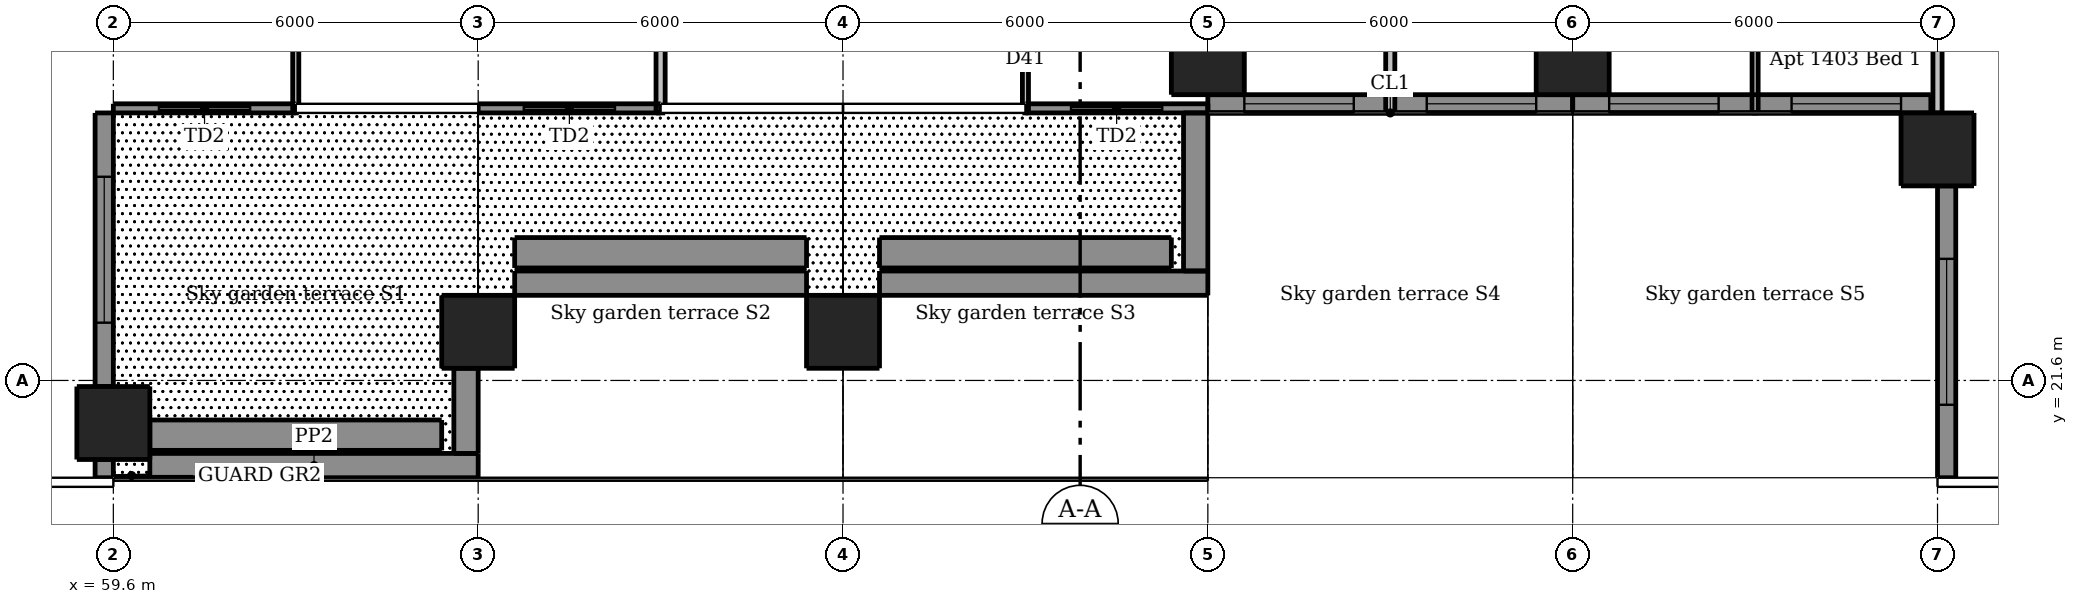
"""IFC4 building model, lengths in metres.
Left out: names, types, materials, properties, quantities, classifications, styles, units other than length and angle.
Written with IfcOpenShell. Run it as: python <this file> out.ifc"""

import sys

from ifc_helpers import new_model, si_unit, direction, frame, frame_2d, origin, origin_2d, place, context, subcontext, project, spatial, rectangle, extrude, element, fill, save


model = new_model("IFC4")
c1 = context("Model", 3, precision=1e-05, world=origin(), true_north=direction((0.0, 1.0)))
c2 = subcontext(c1, "Body", "Model", "MODEL_VIEW")
j1 = project(units=[si_unit("LENGTHUNIT", "METRE"), si_unit("PLANEANGLEUNIT", "RADIAN")], contexts=[c1])
p1 = place(None, origin())
s1 = spatial("IfcSite", under=j1, at=p1, CompositionType="ELEMENT")
p2 = place(p1, origin())
s2 = spatial("IfcBuilding", under=s1, at=p2, CompositionType="ELEMENT")
p3 = place(p2, frame((0.0, 0.0, 53.2)))
s3 = spatial("IfcBuildingStorey", under=s2, at=p3, CompositionType="ELEMENT", Elevation=53.2)
p4 = place(p3, frame((59.6, 20.9, 0.0), z_axis=(0.0, 0.0, 1.0), x_axis=(1.0, 0.0, 0.0)))
e1 = element("IfcColumn", 1, at=p4, inside=s3, PredefinedType="COLUMN", context=c2, shape_type="SweptSolid", body=[
    extrude(rectangle(XDim=1.2, YDim=1.2, at=origin_2d()), origin(), (0.0, 0.0, 1.0), 3.05),
])
for number, where, z_axis, x_axis in (
    (2, (65.6, 22.4, 0.0), (0.0, 0.0, 1.0), (1.0, 0.0, 0.0)),
    (3, (71.6, 22.4, 0.0), (0.0, 0.0, 1.0), (1.0, 0.0, 0.0)),
):
    element("IfcColumn", number, at=place(p3, frame(where, z_axis=z_axis, x_axis=x_axis)), inside=s3, PredefinedType="COLUMN", context=c2, shape_type="SweptSolid", body=[
        extrude(rectangle(XDim=1.2, YDim=1.2, at=origin_2d()), origin(), (0.0, 0.0, 1.0), 3.3),
    ])
for number, where, z_axis, x_axis in (
    (4, (77.6, 26.9, 0.0), (0.0, 0.0, 1.0), (1.0, 0.0, 0.0)),
    (5, (83.6, 26.9, 0.0), (0.0, 0.0, 1.0), (1.0, 0.0, 0.0)),
    (6, (89.6, 25.4, 0.0), (0.0, 0.0, 1.0), (1.0, 0.0, 0.0)),
):
    element("IfcColumn", number, at=place(p3, frame(where, z_axis=z_axis, x_axis=x_axis)), inside=s3, PredefinedType="COLUMN", context=c2, shape_type="SweptSolid", body=[
        extrude(rectangle(XDim=1.2, YDim=1.2, at=origin_2d()), origin(), (0.0, 0.0, 1.0), 3.05),
    ])
p5 = place(p3, frame((59.45, 20.0, 0.0), z_axis=(0.0, 0.0, 1.0), x_axis=(0.0, 1.0, 0.0)))
e7 = element("IfcWall", 7, at=p5, inside=s3, PredefinedType="SOLIDWALL", context=c2, shape_type="SweptSolid", body=[
    extrude(rectangle(XDim=0.3, YDim=0.3, at=frame_2d((0.15, 0.0))), origin(), (0.0, 0.0, 1.0), 3.05),
])
p6 = place(p3, frame((59.45, 21.5, 0.0), z_axis=(0.0, 0.0, 1.0), x_axis=(0.0, 1.0, 0.0)))
e8 = element("IfcWall", 8, at=p6, inside=s3, PredefinedType="SOLIDWALL", context=c2, shape_type="SweptSolid", body=[
    extrude(rectangle(XDim=4.5, YDim=0.3, at=frame_2d((2.25, 0.0))), origin(), (0.0, 0.0, 1.0), 3.05),
])
p7 = place(p6, frame((1.05, 0.0, 0.15)))
e9 = element("IfcOpeningElement", 9, at=p7, cuts=e8, PredefinedType="OPENING", context=c2, shape_type="SweptSolid", body=[
    extrude(rectangle(XDim=2.4, YDim=2.1, at=frame_2d((1.2, 1.05))), frame((0.0, 0.16, 0.0), z_axis=(0.0, -1.0, 0.0), x_axis=(1.0, 0.0, 0.0)), (0.0, 0.0, 1.0), 0.32),
])
p8 = place(p3, frame((89.75, 24.8, 0.0), z_axis=(0.0, 0.0, 1.0), x_axis=(0.0, -1.0, 0.0)))
e10 = element("IfcWall", 10, at=p8, inside=s3, PredefinedType="SOLIDWALL", context=c2, shape_type="SweptSolid", body=[
    extrude(rectangle(XDim=4.8, YDim=0.3, at=frame_2d((2.4, 0.0))), origin(), (0.0, 0.0, 1.0), 3.05),
])
p9 = place(p8, frame((1.2, 0.0, 0.15)))
e11 = element("IfcOpeningElement", 11, at=p9, cuts=e10, PredefinedType="OPENING", context=c2, shape_type="SweptSolid", body=[
    extrude(rectangle(XDim=2.4, YDim=2.1, at=frame_2d((1.2, 1.05))), frame((0.0, 0.16, 0.0), z_axis=(0.0, -1.0, 0.0), x_axis=(1.0, 0.0, 0.0)), (0.0, 0.0, 1.0), 0.32),
])
p10 = place(p3, frame((59.6, 26.075, 0.0), z_axis=(0.0, 0.0, 1.0), x_axis=(1.0, 0.0, 0.0)))
e12 = element("IfcWall", 12, at=p10, inside=s3, PredefinedType="SOLIDWALL", context=c2, shape_type="SweptSolid", body=[
    extrude(rectangle(XDim=3.0, YDim=0.15, at=frame_2d((1.5, 0.0))), origin(), (0.0, 0.0, 1.0), 3.05),
])
p11 = place(p10, frame((0.75, 0.0, 0.0)))
e13 = element("IfcOpeningElement", 13, at=p11, cuts=e12, PredefinedType="OPENING", context=c2, shape_type="SweptSolid", body=[
    extrude(rectangle(XDim=1.5, YDim=2.4, at=frame_2d((0.75, 1.2))), frame((0.0, 0.085, 0.0), z_axis=(0.0, -1.0, 0.0), x_axis=(1.0, 0.0, 0.0)), (0.0, 0.0, 1.0), 0.17),
])
p12 = place(p3, frame((65.6, 26.075, 0.0), z_axis=(0.0, 0.0, 1.0), x_axis=(1.0, 0.0, 0.0)))
e14 = element("IfcWall", 14, at=p12, inside=s3, PredefinedType="SOLIDWALL", context=c2, shape_type="SweptSolid", body=[
    extrude(rectangle(XDim=3.0, YDim=0.15, at=frame_2d((1.5, 0.0))), origin(), (0.0, 0.0, 1.0), 3.05),
])
p13 = place(p12, frame((0.75, 0.0, 0.0)))
e15 = element("IfcOpeningElement", 15, at=p13, cuts=e14, PredefinedType="OPENING", context=c2, shape_type="SweptSolid", body=[
    extrude(rectangle(XDim=1.5, YDim=2.4, at=frame_2d((0.75, 1.2))), frame((0.0, 0.085, 0.0), z_axis=(0.0, -1.0, 0.0), x_axis=(1.0, 0.0, 0.0)), (0.0, 0.0, 1.0), 0.17),
])
p14 = place(p3, frame((74.6, 26.075, 0.0), z_axis=(0.0, 0.0, 1.0), x_axis=(1.0, 0.0, 0.0)))
e16 = element("IfcWall", 16, at=p14, inside=s3, PredefinedType="SOLIDWALL", context=c2, shape_type="SweptSolid", body=[
    extrude(rectangle(XDim=3.0, YDim=0.15, at=frame_2d((1.5, 0.0))), origin(), (0.0, 0.0, 1.0), 3.05),
])
p15 = place(p14, frame((0.75, 0.0, 0.0)))
e17 = element("IfcOpeningElement", 17, at=p15, cuts=e16, PredefinedType="OPENING", context=c2, shape_type="SweptSolid", body=[
    extrude(rectangle(XDim=1.5, YDim=2.4, at=frame_2d((0.75, 1.2))), frame((0.0, 0.085, 0.0), z_axis=(0.0, -1.0, 0.0), x_axis=(1.0, 0.0, 0.0)), (0.0, 0.0, 1.0), 0.17),
])
p16 = place(p3, frame((77.6, 26.15, 0.0), z_axis=(0.0, 0.0, 1.0), x_axis=(1.0, 0.0, 0.0)))
e18 = element("IfcWall", 18, at=p16, inside=s3, PredefinedType="SOLIDWALL", context=c2, shape_type="SweptSolid", body=[
    extrude(rectangle(XDim=6.0, YDim=0.3, at=frame_2d((3.0, 0.0))), origin(), (0.0, 0.0, 1.0), 3.05),
])
p17 = place(p16, frame((0.6, 0.0, 0.15)))
e19 = element("IfcOpeningElement", 19, at=p17, cuts=e18, PredefinedType="OPENING", context=c2, shape_type="SweptSolid", body=[
    extrude(rectangle(XDim=1.8, YDim=2.1, at=frame_2d((0.9, 1.05))), frame((0.0, 0.16, 0.0), z_axis=(0.0, -1.0, 0.0), x_axis=(1.0, 0.0, 0.0)), (0.0, 0.0, 1.0), 0.32),
])
p18 = place(p16, frame((3.6, 0.0, 0.15)))
e20 = element("IfcOpeningElement", 20, at=p18, cuts=e18, PredefinedType="OPENING", context=c2, shape_type="SweptSolid", body=[
    extrude(rectangle(XDim=1.8, YDim=2.1, at=frame_2d((0.9, 1.05))), frame((0.0, 0.16, 0.0), z_axis=(0.0, -1.0, 0.0), x_axis=(1.0, 0.0, 0.0)), (0.0, 0.0, 1.0), 0.32),
])
p19 = place(p3, frame((83.6, 26.15, 0.0), z_axis=(0.0, 0.0, 1.0), x_axis=(1.0, 0.0, 0.0)))
e21 = element("IfcWall", 21, at=p19, inside=s3, PredefinedType="SOLIDWALL", context=c2, shape_type="SweptSolid", body=[
    extrude(rectangle(XDim=5.89, YDim=0.3, at=frame_2d((2.945, 0.0))), origin(), (0.0, 0.0, 1.0), 3.05),
])
p20 = place(p19, frame((0.6, 0.0, 0.15)))
e22 = element("IfcOpeningElement", 22, at=p20, cuts=e21, PredefinedType="OPENING", context=c2, shape_type="SweptSolid", body=[
    extrude(rectangle(XDim=1.8, YDim=2.1, at=frame_2d((0.9, 1.05))), frame((0.0, 0.16, 0.0), z_axis=(0.0, -1.0, 0.0), x_axis=(1.0, 0.0, 0.0)), (0.0, 0.0, 1.0), 0.32),
])
p21 = place(p19, frame((3.6, 0.0, 0.15)))
e23 = element("IfcOpeningElement", 23, at=p21, cuts=e21, PredefinedType="OPENING", context=c2, shape_type="SweptSolid", body=[
    extrude(rectangle(XDim=1.8, YDim=2.1, at=frame_2d((0.9, 1.05))), frame((0.0, 0.16, 0.0), z_axis=(0.0, -1.0, 0.0), x_axis=(1.0, 0.0, 0.0)), (0.0, 0.0, 1.0), 0.32),
])
p22 = place(p3, frame((60.2, 20.2, 0.03), z_axis=(0.0, 0.0, 1.0), x_axis=(1.0, 0.0, 0.0)))
e24 = element("IfcWall", 24, at=p22, inside=s3, PredefinedType="PARAPET", context=c2, shape_type="SweptSolid", body=[
    extrude(rectangle(XDim=5.4, YDim=0.4, at=frame_2d((2.7, 0.0))), origin(), (0.0, 0.0, 1.0), 1.1),
])
p23 = place(p3, frame((65.4, 20.4, 0.03), z_axis=(0.0, 0.0, 1.0), x_axis=(0.0, 1.0, 0.0)))
e25 = element("IfcWall", 25, at=p23, inside=s3, PredefinedType="PARAPET", context=c2, shape_type="SweptSolid", body=[
    extrude(rectangle(XDim=1.4, YDim=0.4, at=frame_2d((0.7, 0.0))), origin(), (0.0, 0.0, 1.0), 1.1),
])
p24 = place(p3, frame((60.2, 20.7, 0.03), z_axis=(0.0, 0.0, 1.0), x_axis=(1.0, 0.0, 0.0)))
e26 = element("IfcWall", 26, at=p24, inside=s3, PredefinedType="SOLIDWALL", context=c2, shape_type="SweptSolid", body=[
    extrude(rectangle(XDim=4.8, YDim=0.5, at=frame_2d((2.4, 0.0))), origin(), (0.0, 0.0, 1.0), 0.6),
])
p25 = place(p3, frame((66.2, 23.2, 0.03), z_axis=(0.0, 0.0, 1.0), x_axis=(1.0, 0.0, 0.0)))
e27 = element("IfcWall", 27, at=p25, inside=s3, PredefinedType="PARAPET", context=c2, shape_type="SweptSolid", body=[
    extrude(rectangle(XDim=4.8, YDim=0.4, at=frame_2d((2.4, 0.0))), origin(), (0.0, 0.0, 1.0), 1.1),
])
p26 = place(p3, frame((66.2, 23.7, 0.03), z_axis=(0.0, 0.0, 1.0), x_axis=(1.0, 0.0, 0.0)))
e28 = element("IfcWall", 28, at=p26, inside=s3, PredefinedType="SOLIDWALL", context=c2, shape_type="SweptSolid", body=[
    extrude(rectangle(XDim=4.8, YDim=0.5, at=frame_2d((2.4, 0.0))), origin(), (0.0, 0.0, 1.0), 0.6),
])
p27 = place(p3, frame((72.2, 23.2, 0.03), z_axis=(0.0, 0.0, 1.0), x_axis=(1.0, 0.0, 0.0)))
e29 = element("IfcWall", 29, at=p27, inside=s3, PredefinedType="PARAPET", context=c2, shape_type="SweptSolid", body=[
    extrude(rectangle(XDim=5.4, YDim=0.4, at=frame_2d((2.7, 0.0))), origin(), (0.0, 0.0, 1.0), 1.1),
])
p28 = place(p3, frame((77.4, 23.4, 0.03), z_axis=(0.0, 0.0, 1.0), x_axis=(0.0, 1.0, 0.0)))
e30 = element("IfcWall", 30, at=p28, inside=s3, PredefinedType="PARAPET", context=c2, shape_type="SweptSolid", body=[
    extrude(rectangle(XDim=2.6, YDim=0.4, at=frame_2d((1.3, 0.0))), origin(), (0.0, 0.0, 1.0), 1.1),
])
p29 = place(p3, frame((72.2, 23.7, 0.03), z_axis=(0.0, 0.0, 1.0), x_axis=(1.0, 0.0, 0.0)))
e31 = element("IfcWall", 31, at=p29, inside=s3, PredefinedType="SOLIDWALL", context=c2, shape_type="SweptSolid", body=[
    extrude(rectangle(XDim=4.8, YDim=0.5, at=frame_2d((2.4, 0.0))), origin(), (0.0, 0.0, 1.0), 0.6),
])
p30 = place(p3, frame((62.6, 31.625, 0.0), z_axis=(0.0, 0.0, 1.0), x_axis=(0.0, -1.0, 0.0)))
e32 = element("IfcWall", 32, at=p30, inside=s3, PredefinedType="PARTITIONING", context=c2, shape_type="SweptSolid", body=[
    extrude(rectangle(XDim=5.625, YDim=0.1, at=frame_2d((2.812, 0.0))), origin(), (0.0, 0.0, 1.0), 3.05),
])
p31 = place(p30, frame((0.525, 0.0, 0.0)))
e33 = element("IfcOpeningElement", 33, at=p31, cuts=e32, PredefinedType="OPENING", context=c2, shape_type="SweptSolid", body=[
    extrude(rectangle(XDim=0.9, YDim=2.1, at=frame_2d((0.45, 1.05))), frame((0.0, 0.06, 0.0), z_axis=(0.0, -1.0, 0.0), x_axis=(1.0, 0.0, 0.0)), (0.0, 0.0, 1.0), 0.12),
])
p32 = place(p30, frame((3.375, 0.0, 0.0)))
e34 = element("IfcOpeningElement", 34, at=p32, cuts=e32, PredefinedType="OPENING", context=c2, shape_type="SweptSolid", body=[
    extrude(rectangle(XDim=0.9, YDim=2.1, at=frame_2d((0.45, 1.05))), frame((0.0, 0.06, 0.0), z_axis=(0.0, -1.0, 0.0), x_axis=(1.0, 0.0, 0.0)), (0.0, 0.0, 1.0), 0.12),
])
p33 = place(p3, frame((74.6, 26.0, 0.0), z_axis=(0.0, 0.0, 1.0), x_axis=(0.0, 1.0, 0.0)))
e35 = element("IfcWall", 35, at=p33, inside=s3, PredefinedType="PARTITIONING", context=c2, shape_type="SweptSolid", body=[
    extrude(rectangle(XDim=5.625, YDim=0.1, at=frame_2d((2.812, 0.0))), origin(), (0.0, 0.0, 1.0), 3.05),
])
p34 = place(p33, frame((1.35, 0.0, 0.0)))
e36 = element("IfcOpeningElement", 36, at=p34, cuts=e35, PredefinedType="OPENING", context=c2, shape_type="SweptSolid", body=[
    extrude(rectangle(XDim=0.9, YDim=2.1, at=frame_2d((0.45, 1.05))), frame((0.0, 0.06, 0.0), z_axis=(0.0, -1.0, 0.0), x_axis=(1.0, 0.0, 0.0)), (0.0, 0.0, 1.0), 0.12),
])
p35 = place(p33, frame((4.25, 0.0, 0.0)))
e37 = element("IfcOpeningElement", 37, at=p35, cuts=e35, PredefinedType="OPENING", context=c2, shape_type="SweptSolid", body=[
    extrude(rectangle(XDim=0.8, YDim=2.1, at=frame_2d((0.4, 1.05))), frame((0.0, 0.06, 0.0), z_axis=(0.0, -1.0, 0.0), x_axis=(1.0, 0.0, 0.0)), (0.0, 0.0, 1.0), 0.12),
])
p36 = place(p3, frame((86.6, 31.625, 0.0), z_axis=(0.0, 0.0, 1.0), x_axis=(0.0, -1.0, 0.0)))
e38 = element("IfcWall", 38, at=p36, inside=s3, PredefinedType="PARTITIONING", context=c2, shape_type="SweptSolid", body=[
    extrude(rectangle(XDim=5.625, YDim=0.1, at=frame_2d((2.812, 0.0))), origin(), (0.0, 0.0, 1.0), 3.05),
])
p37 = place(p36, frame((3.375, 0.0, 0.0)))
e39 = element("IfcOpeningElement", 39, at=p37, cuts=e38, PredefinedType="OPENING", context=c2, shape_type="SweptSolid", body=[
    extrude(rectangle(XDim=0.9, YDim=2.1, at=frame_2d((0.45, 1.05))), frame((0.0, 0.06, 0.0), z_axis=(0.0, -1.0, 0.0), x_axis=(1.0, 0.0, 0.0)), (0.0, 0.0, 1.0), 0.12),
])
p38 = place(p36, frame((0.575, 0.0, 0.0)))
e40 = element("IfcOpeningElement", 40, at=p38, cuts=e38, PredefinedType="OPENING", context=c2, shape_type="SweptSolid", body=[
    extrude(rectangle(XDim=0.8, YDim=2.1, at=frame_2d((0.4, 1.05))), frame((0.0, 0.06, 0.0), z_axis=(0.0, -1.0, 0.0), x_axis=(1.0, 0.0, 0.0)), (0.0, 0.0, 1.0), 0.12),
])
for number, where, z_axis, x_axis in (
    (41, (68.6, 26.0, 0.0), (0.0, 0.0, 1.0), (0.0, 1.0, 0.0)),
    (42, (80.6, 26.0, 0.0), (0.0, 0.0, 1.0), (0.0, 1.0, 0.0)),
):
    element("IfcWall", number, at=place(p3, frame(where, z_axis=z_axis, x_axis=x_axis)), inside=s3, PredefinedType="PARTITIONING", context=c2, shape_type="SweptSolid", body=[
        extrude(rectangle(XDim=5.625, YDim=0.15, at=frame_2d((2.812, 0.0))), origin(), (0.0, 0.0, 1.0), 3.05),
    ])
p39 = place(p3, frame((89.6, 26.0, 0.0), z_axis=(0.0, 0.0, 1.0), x_axis=(0.0, 1.0, 0.0)))
e43 = element("IfcWall", 43, at=p39, inside=s3, PredefinedType="PARTITIONING", context=c2, shape_type="SweptSolid", body=[
    extrude(rectangle(XDim=5.775, YDim=0.15, at=frame_2d((2.887, 0.0))), origin(), (0.0, 0.0, 1.0), 2.516),
])
p40 = place(p7, origin())
e44 = element("IfcWindow", 44, at=p40, inside=s3, PartitioningType="DOUBLE_PANEL_VERTICAL", PredefinedType="WINDOW", context=c2, shape_type="SweptSolid", body=[
    extrude(rectangle(XDim=2.4, YDim=2.1, at=frame_2d((1.2, 1.05))), frame((0.0, 0.03, 0.0), z_axis=(0.0, -1.0, 0.0), x_axis=(1.0, 0.0, 0.0)), (0.0, 0.0, 1.0), 0.06),
])
fill(e9, e44)
p41 = place(p9, origin())
e45 = element("IfcWindow", 45, at=p41, inside=s3, PartitioningType="DOUBLE_PANEL_VERTICAL", PredefinedType="WINDOW", context=c2, shape_type="SweptSolid", body=[
    extrude(rectangle(XDim=2.4, YDim=2.1, at=frame_2d((1.2, 1.05))), frame((0.0, 0.03, 0.0), z_axis=(0.0, -1.0, 0.0), x_axis=(1.0, 0.0, 0.0)), (0.0, 0.0, 1.0), 0.06),
])
fill(e11, e45)
p42 = place(p11, origin())
e46 = element("IfcDoor", 46, at=p42, inside=s3, OperationType="DOUBLE_DOOR_SLIDING", PredefinedType="DOOR", context=c2, shape_type="SweptSolid", body=[
    extrude(rectangle(XDim=1.5, YDim=2.4, at=frame_2d((0.75, 1.2))), frame((0.0, 0.025, 0.0), z_axis=(0.0, -1.0, 0.0), x_axis=(1.0, 0.0, 0.0)), (0.0, 0.0, 1.0), 0.05),
])
fill(e13, e46)
p43 = place(p13, origin())
e47 = element("IfcDoor", 47, at=p43, inside=s3, OperationType="DOUBLE_DOOR_SLIDING", PredefinedType="DOOR", context=c2, shape_type="SweptSolid", body=[
    extrude(rectangle(XDim=1.5, YDim=2.4, at=frame_2d((0.75, 1.2))), frame((0.0, 0.025, 0.0), z_axis=(0.0, -1.0, 0.0), x_axis=(1.0, 0.0, 0.0)), (0.0, 0.0, 1.0), 0.05),
])
fill(e15, e47)
p44 = place(p15, origin())
e48 = element("IfcDoor", 48, at=p44, inside=s3, OperationType="DOUBLE_DOOR_SLIDING", PredefinedType="DOOR", context=c2, shape_type="SweptSolid", body=[
    extrude(rectangle(XDim=1.5, YDim=2.4, at=frame_2d((0.75, 1.2))), frame((0.0, 0.025, 0.0), z_axis=(0.0, -1.0, 0.0), x_axis=(1.0, 0.0, 0.0)), (0.0, 0.0, 1.0), 0.05),
])
fill(e17, e48)
p45 = place(p17, origin())
e49 = element("IfcWindow", 49, at=p45, inside=s3, PartitioningType="DOUBLE_PANEL_VERTICAL", PredefinedType="WINDOW", context=c2, shape_type="SweptSolid", body=[
    extrude(rectangle(XDim=1.8, YDim=2.1, at=frame_2d((0.9, 1.05))), frame((0.0, 0.03, 0.0), z_axis=(0.0, -1.0, 0.0), x_axis=(1.0, 0.0, 0.0)), (0.0, 0.0, 1.0), 0.06),
])
fill(e19, e49)
p46 = place(p18, origin())
e50 = element("IfcWindow", 50, at=p46, inside=s3, PartitioningType="DOUBLE_PANEL_VERTICAL", PredefinedType="WINDOW", context=c2, shape_type="SweptSolid", body=[
    extrude(rectangle(XDim=1.8, YDim=2.1, at=frame_2d((0.9, 1.05))), frame((0.0, 0.03, 0.0), z_axis=(0.0, -1.0, 0.0), x_axis=(1.0, 0.0, 0.0)), (0.0, 0.0, 1.0), 0.06),
])
fill(e20, e50)
p47 = place(p20, origin())
e51 = element("IfcWindow", 51, at=p47, inside=s3, PartitioningType="DOUBLE_PANEL_VERTICAL", PredefinedType="WINDOW", context=c2, shape_type="SweptSolid", body=[
    extrude(rectangle(XDim=1.8, YDim=2.1, at=frame_2d((0.9, 1.05))), frame((0.0, 0.03, 0.0), z_axis=(0.0, -1.0, 0.0), x_axis=(1.0, 0.0, 0.0)), (0.0, 0.0, 1.0), 0.06),
])
fill(e22, e51)
p48 = place(p21, origin())
e52 = element("IfcWindow", 52, at=p48, inside=s3, PartitioningType="DOUBLE_PANEL_VERTICAL", PredefinedType="WINDOW", context=c2, shape_type="SweptSolid", body=[
    extrude(rectangle(XDim=1.8, YDim=2.1, at=frame_2d((0.9, 1.05))), frame((0.0, 0.03, 0.0), z_axis=(0.0, -1.0, 0.0), x_axis=(1.0, 0.0, 0.0)), (0.0, 0.0, 1.0), 0.06),
])
fill(e23, e52)
save(model, sys.argv[1])
